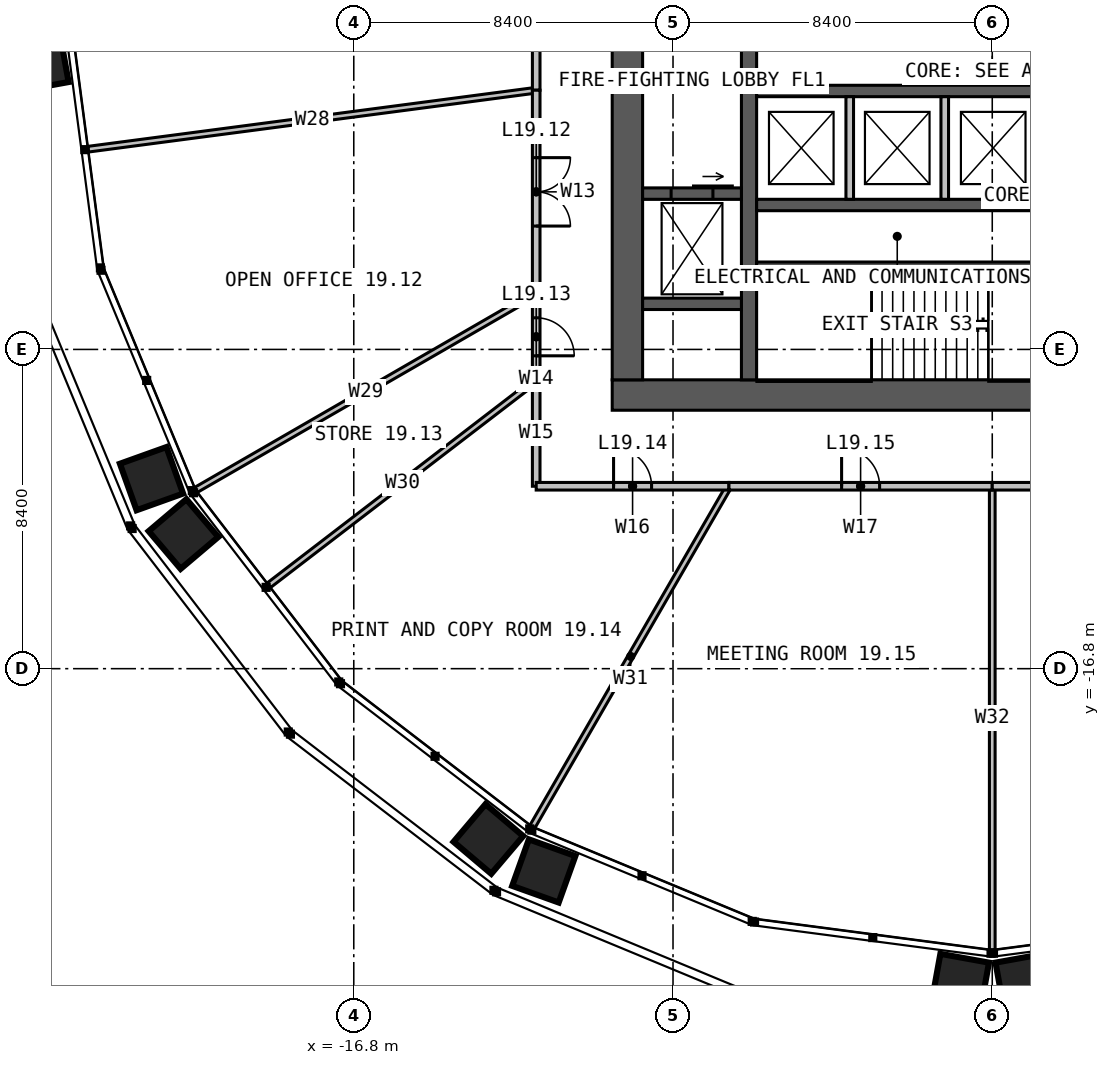
"""IFC4 building model, lengths in metres.
Left out: names, types, materials, properties, quantities, classifications, styles, units other than length and angle.
Written with IfcOpenShell. Run it as: python <this file> out.ifc"""

import sys

from ifc_helpers import new_model, si_unit, direction, frame, frame_2d, origin, place, context, subcontext, project, spatial, rectangle, extrude, element, fill, save


model = new_model("IFC4")
c1 = context("Model", 3, precision=1e-05, world=origin(), true_north=direction((0.0, 1.0)))
c2 = subcontext(c1, "Body", "Model", "MODEL_VIEW")
j1 = project(units=[si_unit("LENGTHUNIT", "METRE"), si_unit("PLANEANGLEUNIT", "RADIAN")], contexts=[c1])
p1 = place(None, origin())
s1 = spatial("IfcSite", under=j1, at=p1, CompositionType="ELEMENT")
p2 = place(p1, origin())
s2 = spatial("IfcBuilding", under=s1, at=p2, CompositionType="ELEMENT")
p3 = place(p2, frame((0.0, 0.0, 81.0)))
s3 = spatial("IfcBuildingStorey", under=s2, at=p3, CompositionType="ELEMENT", Elevation=81.0)
p4 = place(p3, frame((10.0, -9.6, 0.0), z_axis=(0.0, 0.0, 1.0), x_axis=(-1.0, 0.0, 0.0)))
e1 = element("IfcWall", 1, at=p4, inside=s3, PredefinedType="SOLIDWALL", context=c2, shape_type="SweptSolid", body=[
    extrude(rectangle(XDim=20.0, YDim=0.8, at=frame_2d((10.0, 0.0))), origin(), (0.0, 0.0, 1.0), 4.0),
])
p5 = place(p4, frame((6.875, 0.0, 0.0)))
e2 = element("IfcOpeningElement", 2, at=p5, cuts=e1, PredefinedType="OPENING", context=c2, shape_type="SweptSolid", body=[
    extrude(rectangle(XDim=1.2, YDim=2.2, at=frame_2d((0.6, 1.1))), frame((0.0, 0.41, 0.0), z_axis=(0.0, -1.0, 0.0), x_axis=(1.0, 0.0, 0.0)), (0.0, 0.0, 1.0), 0.82),
])
p6 = place(p3, frame((-9.6, 9.2, 0.0), z_axis=(0.0, 0.0, 1.0), x_axis=(0.0, -1.0, 0.0)))
e3 = element("IfcWall", 3, at=p6, inside=s3, PredefinedType="SOLIDWALL", context=c2, shape_type="SweptSolid", body=[
    extrude(rectangle(XDim=18.4, YDim=0.8, at=frame_2d((9.2, 0.0))), origin(), (0.0, 0.0, 1.0), 4.0),
])
p7 = place(p3, frame((-6.4, -9.2, 0.0), z_axis=(0.0, 0.0, 1.0), x_axis=(0.0, 1.0, 0.0)))
e4 = element("IfcWall", 4, at=p7, inside=s3, PredefinedType="SOLIDWALL", context=c2, shape_type="SweptSolid", body=[
    extrude(rectangle(XDim=18.4, YDim=0.4, at=frame_2d((9.2, 0.0))), origin(), (0.0, 0.0, 1.0), 4.0),
])
p8 = place(p7, frame((8.7, 0.0, 0.0)))
e5 = element("IfcOpeningElement", 5, at=p8, cuts=e4, PredefinedType="OPENING", context=c2, shape_type="SweptSolid", body=[
    extrude(rectangle(XDim=1.0, YDim=2.2, at=frame_2d((0.5, 1.1))), frame((0.0, 0.21, 0.0), z_axis=(0.0, -1.0, 0.0), x_axis=(1.0, 0.0, 0.0)), (0.0, 0.0, 1.0), 0.42),
])
for number, where, z_axis, x_axis in (
    (6, (-6.2, -1.6, 0.0), (0.0, 0.0, 1.0), (1.0, 0.0, 0.0)),
    (7, (-6.2, -4.6, 0.0), (0.0, 0.0, 1.0), (1.0, 0.0, 0.0)),
):
    element("IfcWall", number, at=place(p3, frame(where, z_axis=z_axis, x_axis=x_axis)), inside=s3, PredefinedType="SOLIDWALL", context=c2, shape_type="SweptSolid", body=[
        extrude(rectangle(XDim=7.4, YDim=0.3, at=frame_2d((3.7, 0.0))), origin(), (0.0, 0.0, 1.0), 4.0),
    ])
p9 = place(p3, frame((-6.2, -6.2, 0.0), z_axis=(0.0, 0.0, 1.0), x_axis=(1.0, 0.0, 0.0)))
e8 = element("IfcWall", 8, at=p9, inside=s3, PredefinedType="SOLIDWALL", context=c2, shape_type="SweptSolid", body=[
    extrude(rectangle(XDim=7.4, YDim=0.2, at=frame_2d((3.7, 0.0))), origin(), (0.0, 0.0, 1.0), 4.0),
])
p10 = place(p3, frame((-9.2, -4.3, 0.0), z_axis=(0.0, 0.0, 1.0), x_axis=(1.0, 0.0, 0.0)))
e9 = element("IfcWall", 9, at=p10, inside=s3, PredefinedType="SOLIDWALL", context=c2, shape_type="SweptSolid", body=[
    extrude(rectangle(XDim=2.6, YDim=0.3, at=frame_2d((1.3, 0.0))), origin(), (0.0, 0.0, 1.0), 4.0),
])
p11 = place(p10, frame((0.75, 0.0, 0.0)))
e10 = element("IfcOpeningElement", 10, at=p11, cuts=e9, PredefinedType="OPENING", context=c2, shape_type="SweptSolid", body=[
    extrude(rectangle(XDim=1.1, YDim=2.2, at=frame_2d((0.55, 1.1))), frame((0.0, 0.16, 0.0), z_axis=(0.0, -1.0, 0.0), x_axis=(1.0, 0.0, 0.0)), (0.0, 0.0, 1.0), 0.32),
])
p12 = place(p3, frame((-9.2, -7.2, 0.0), z_axis=(0.0, 0.0, 1.0), x_axis=(1.0, 0.0, 0.0)))
e11 = element("IfcWall", 11, at=p12, inside=s3, PredefinedType="SOLIDWALL", context=c2, shape_type="SweptSolid", body=[
    extrude(rectangle(XDim=2.6, YDim=0.3, at=frame_2d((1.3, 0.0))), origin(), (0.0, 0.0, 1.0), 4.0),
])
for number, where, z_axis, x_axis in (
    (12, (-3.75, -1.75, 0.0), (0.0, 0.0, 1.0), (0.0, -1.0, 0.0)),
    (13, (-1.25, -1.75, 0.0), (0.0, 0.0, 1.0), (0.0, -1.0, 0.0)),
):
    element("IfcWall", number, at=place(p3, frame(where, z_axis=z_axis, x_axis=x_axis)), inside=s3, PredefinedType="SOLIDWALL", context=c2, shape_type="SweptSolid", body=[
        extrude(rectangle(XDim=2.7, YDim=0.2, at=frame_2d((1.35, 0.0))), origin(), (0.0, 0.0, 1.0), 3.75),
    ])
p13 = place(p3, frame((-12.0, -1.58, 0.0), z_axis=(0.0, 0.0, 1.0), x_axis=(-0.991444996724, -0.130525164133, 0.0)))
e14 = element("IfcWall", 14, at=p13, inside=s3, PredefinedType="PARTITIONING", context=c2, shape_type="SweptSolid", body=[
    extrude(rectangle(XDim=11.889, YDim=0.15, at=frame_2d((5.944, 0.0))), origin(), (0.0, 0.0, 1.0), 2.79),
])
p14 = place(p3, frame((-12.0, -6.928, 0.0), z_axis=(0.0, 0.0, 1.0), x_axis=(-0.866023632182, -0.500003068493, 0.0)))
e15 = element("IfcWall", 15, at=p14, inside=s3, PredefinedType="PARTITIONING", context=c2, shape_type="SweptSolid", body=[
    extrude(rectangle(XDim=10.343, YDim=0.15, at=frame_2d((5.171, 0.0))), origin(), (0.0, 0.0, 1.0), 2.79),
])
p15 = place(p3, frame((-12.0, -9.208, 0.0), z_axis=(0.0, 0.0, 1.0), x_axis=(-0.793356334848, -0.608757526406, 0.0)))
e16 = element("IfcWall", 16, at=p15, inside=s3, PredefinedType="PARTITIONING", context=c2, shape_type="SweptSolid", body=[
    extrude(rectangle(XDim=8.866, YDim=0.15, at=frame_2d((4.433, 0.0))), origin(), (0.0, 0.0, 1.0), 2.79),
])
p16 = place(p3, frame((-6.928, -12.0, 0.0), z_axis=(0.0, 0.0, 1.0), x_axis=(-0.500003068493, -0.866023632182, 0.0)))
e17 = element("IfcWall", 17, at=p16, inside=s3, PredefinedType="PARTITIONING", context=c2, shape_type="SweptSolid", body=[
    extrude(rectangle(XDim=10.343, YDim=0.15, at=frame_2d((5.171, 0.0))), origin(), (0.0, 0.0, 1.0), 2.79),
])
p17 = place(p3, frame((0.0, -12.0, 0.0), z_axis=(0.0, 0.0, 1.0), x_axis=(0.0, -1.0, 0.0)))
e18 = element("IfcWall", 18, at=p17, inside=s3, PredefinedType="PARTITIONING", context=c2, shape_type="SweptSolid", body=[
    extrude(rectangle(XDim=12.199, YDim=0.15, at=frame_2d((6.1, 0.0))), origin(), (0.0, 0.0, 1.0), 2.79),
])
p18 = place(p3, frame((-12.0, 6.928, 0.0), z_axis=(0.0, 0.0, 1.0), x_axis=(0.0, -1.0, 0.0)))
e19 = element("IfcWall", 19, at=p18, inside=s3, PredefinedType="PARTITIONING", context=c2, shape_type="SweptSolid", body=[
    extrude(rectangle(XDim=8.508, YDim=0.2, at=frame_2d((4.254, 0.0))), origin(), (0.0, 0.0, 1.0), 3.8),
])
p19 = place(p18, frame((3.354, 0.0, 0.0)))
e20 = element("IfcOpeningElement", 20, at=p19, cuts=e19, PredefinedType="OPENING", context=c2, shape_type="SweptSolid", body=[
    extrude(rectangle(XDim=1.8, YDim=2.2, at=frame_2d((0.9, 1.1))), frame((0.0, 0.11, 0.0), z_axis=(0.0, -1.0, 0.0), x_axis=(1.0, 0.0, 0.0)), (0.0, 0.0, 1.0), 0.22),
])
p20 = place(p3, frame((-12.0, -1.58, 0.0), z_axis=(0.0, 0.0, 1.0), x_axis=(0.0, -1.0, 0.0)))
e21 = element("IfcWall", 21, at=p20, inside=s3, PredefinedType="PARTITIONING", context=c2, shape_type="SweptSolid", body=[
    extrude(rectangle(XDim=5.348, YDim=0.2, at=frame_2d((2.674, 0.0))), origin(), (0.0, 0.0, 1.0), 3.8),
])
p21 = place(p20, frame((1.774, 0.0, 0.0)))
e22 = element("IfcOpeningElement", 22, at=p21, cuts=e21, PredefinedType="OPENING", context=c2, shape_type="SweptSolid", body=[
    extrude(rectangle(XDim=1.8, YDim=2.2, at=frame_2d((0.9, 1.1))), frame((0.0, 0.11, 0.0), z_axis=(0.0, -1.0, 0.0), x_axis=(1.0, 0.0, 0.0)), (0.0, 0.0, 1.0), 0.22),
])
p22 = place(p3, frame((-12.0, -6.928, 0.0), z_axis=(0.0, 0.0, 1.0), x_axis=(0.0, -1.0, 0.0)))
e23 = element("IfcWall", 23, at=p22, inside=s3, PredefinedType="PARTITIONING", context=c2, shape_type="SweptSolid", body=[
    extrude(rectangle(XDim=2.28, YDim=0.2, at=frame_2d((1.14, 0.0))), origin(), (0.0, 0.0, 1.0), 3.8),
])
p23 = place(p22, frame((0.64, 0.0, 0.0)))
e24 = element("IfcOpeningElement", 24, at=p23, cuts=e23, PredefinedType="OPENING", context=c2, shape_type="SweptSolid", body=[
    extrude(rectangle(XDim=1.0, YDim=2.2, at=frame_2d((0.5, 1.1))), frame((0.0, 0.11, 0.0), z_axis=(0.0, -1.0, 0.0), x_axis=(1.0, 0.0, 0.0)), (0.0, 0.0, 1.0), 0.22),
])
p24 = place(p3, frame((-12.0, -9.208, 0.0), z_axis=(0.0, 0.0, 1.0), x_axis=(0.0, -1.0, 0.0)))
e25 = element("IfcWall", 25, at=p24, inside=s3, PredefinedType="PARTITIONING", context=c2, shape_type="SweptSolid", body=[
    extrude(rectangle(XDim=2.792, YDim=0.2, at=frame_2d((1.396, 0.0))), origin(), (0.0, 0.0, 1.0), 3.8),
])
p25 = place(p3, frame((-12.0, -12.0, 0.0), z_axis=(0.0, 0.0, 1.0), x_axis=(1.0, 0.0, 0.0)))
e26 = element("IfcWall", 26, at=p25, inside=s3, PredefinedType="PARTITIONING", context=c2, shape_type="SweptSolid", body=[
    extrude(rectangle(XDim=5.072, YDim=0.2, at=frame_2d((2.536, 0.0))), origin(), (0.0, 0.0, 1.0), 3.8),
])
p26 = place(p25, frame((2.036, 0.0, 0.0)))
e27 = element("IfcOpeningElement", 27, at=p26, cuts=e26, PredefinedType="OPENING", context=c2, shape_type="SweptSolid", body=[
    extrude(rectangle(XDim=1.0, YDim=2.2, at=frame_2d((0.5, 1.1))), frame((0.0, 0.11, 0.0), z_axis=(0.0, -1.0, 0.0), x_axis=(1.0, 0.0, 0.0)), (0.0, 0.0, 1.0), 0.22),
])
p27 = place(p3, frame((-6.928, -12.0, 0.0), z_axis=(0.0, 0.0, 1.0), x_axis=(1.0, 0.0, 0.0)))
e28 = element("IfcWall", 28, at=p27, inside=s3, PredefinedType="PARTITIONING", context=c2, shape_type="SweptSolid", body=[
    extrude(rectangle(XDim=6.928, YDim=0.2, at=frame_2d((3.464, 0.0))), origin(), (0.0, 0.0, 1.0), 3.8),
])
p28 = place(p27, frame((2.964, 0.0, 0.0)))
e29 = element("IfcOpeningElement", 29, at=p28, cuts=e28, PredefinedType="OPENING", context=c2, shape_type="SweptSolid", body=[
    extrude(rectangle(XDim=1.0, YDim=2.2, at=frame_2d((0.5, 1.1))), frame((0.0, 0.11, 0.0), z_axis=(0.0, -1.0, 0.0), x_axis=(1.0, 0.0, 0.0)), (0.0, 0.0, 1.0), 0.22),
])
p29 = place(p3, frame((0.0, -12.0, 0.0), z_axis=(0.0, 0.0, 1.0), x_axis=(1.0, 0.0, 0.0)))
e30 = element("IfcWall", 30, at=p29, inside=s3, PredefinedType="PARTITIONING", context=c2, shape_type="SweptSolid", body=[
    extrude(rectangle(XDim=6.928, YDim=0.2, at=frame_2d((3.464, 0.0))), origin(), (0.0, 0.0, 1.0), 3.8),
])
p30 = place(p29, frame((2.964, 0.0, 0.0)))
e31 = element("IfcOpeningElement", 31, at=p30, cuts=e30, PredefinedType="OPENING", context=c2, shape_type="SweptSolid", body=[
    extrude(rectangle(XDim=1.0, YDim=2.2, at=frame_2d((0.5, 1.1))), frame((0.0, 0.11, 0.0), z_axis=(0.0, -1.0, 0.0), x_axis=(1.0, 0.0, 0.0)), (0.0, 0.0, 1.0), 0.22),
])
p31 = place(p11, origin())
e32 = element("IfcDoor", 32, at=p31, inside=s3, OperationType="SLIDING_TO_LEFT", PredefinedType="DOOR", context=c2, shape_type="SweptSolid", body=[
    extrude(rectangle(XDim=1.1, YDim=2.2, at=frame_2d((0.55, 1.1))), frame((0.0, 0.025, 0.0), z_axis=(0.0, -1.0, 0.0), x_axis=(1.0, 0.0, 0.0)), (0.0, 0.0, 1.0), 0.05),
])
fill(e10, e32)
p32 = place(p21, origin())
e33 = element("IfcDoor", 33, at=p32, inside=s3, OperationType="DOUBLE_DOOR_SINGLE_SWING", PredefinedType="DOOR", context=c2, shape_type="SweptSolid", body=[
    extrude(rectangle(XDim=1.8, YDim=2.2, at=frame_2d((0.9, 1.1))), frame((0.0, 0.025, 0.0), z_axis=(0.0, -1.0, 0.0), x_axis=(1.0, 0.0, 0.0)), (0.0, 0.0, 1.0), 0.05),
])
fill(e22, e33)
p33 = place(p23, origin())
e34 = element("IfcDoor", 34, at=p33, inside=s3, OperationType="SINGLE_SWING_RIGHT", PredefinedType="DOOR", context=c2, shape_type="SweptSolid", body=[
    extrude(rectangle(XDim=1.0, YDim=2.2, at=frame_2d((0.5, 1.1))), frame((0.0, 0.025, 0.0), z_axis=(0.0, -1.0, 0.0), x_axis=(1.0, 0.0, 0.0)), (0.0, 0.0, 1.0), 0.05),
])
fill(e24, e34)
p34 = place(p26, origin())
e35 = element("IfcDoor", 35, at=p34, inside=s3, OperationType="SINGLE_SWING_LEFT", PredefinedType="DOOR", context=c2, shape_type="SweptSolid", body=[
    extrude(rectangle(XDim=1.0, YDim=2.2, at=frame_2d((0.5, 1.1))), frame((0.0, 0.025, 0.0), z_axis=(0.0, -1.0, 0.0), x_axis=(1.0, 0.0, 0.0)), (0.0, 0.0, 1.0), 0.05),
])
fill(e27, e35)
p35 = place(p28, origin())
e36 = element("IfcDoor", 36, at=p35, inside=s3, OperationType="SINGLE_SWING_LEFT", PredefinedType="DOOR", context=c2, shape_type="SweptSolid", body=[
    extrude(rectangle(XDim=1.0, YDim=2.2, at=frame_2d((0.5, 1.1))), frame((0.0, 0.025, 0.0), z_axis=(0.0, -1.0, 0.0), x_axis=(1.0, 0.0, 0.0)), (0.0, 0.0, 1.0), 0.05),
])
fill(e29, e36)
save(model, sys.argv[1])
